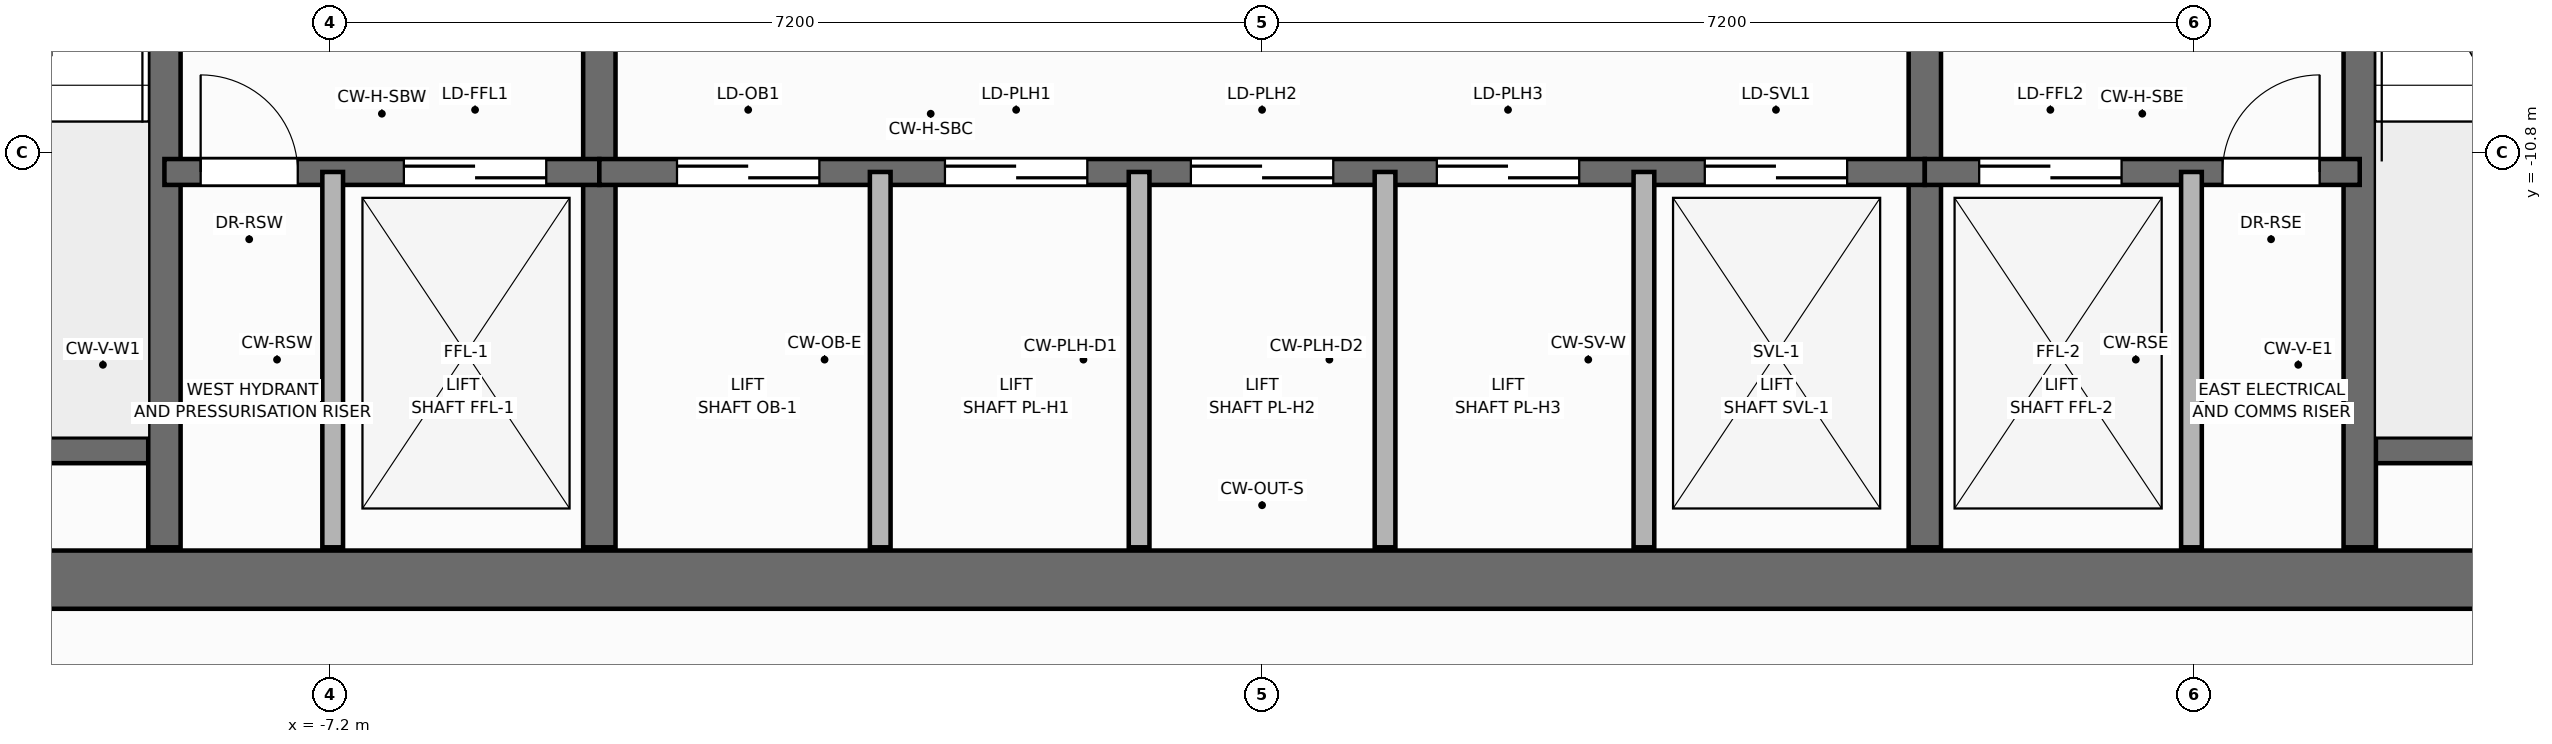
"""IFC4 building model, lengths in metres.
Left out: names, types, materials, properties, quantities, classifications, styles, units other than length and angle.
Written with IfcOpenShell. Run it as: python <this file> out.ifc"""

import sys

from ifc_helpers import new_model, si_unit, direction, frame, frame_2d, origin, place, context, subcontext, project, spatial, rectangle, extrude, element, fill, save


model = new_model("IFC4")
c1 = context("Model", 3, precision=1e-05, world=origin(), true_north=direction((0.0, 1.0)))
c2 = subcontext(c1, "Body", "Model", "MODEL_VIEW")
j1 = project(units=[si_unit("LENGTHUNIT", "METRE"), si_unit("PLANEANGLEUNIT", "RADIAN")], contexts=[c1])
p1 = place(None, origin())
s1 = spatial("IfcSite", under=j1, at=p1, CompositionType="ELEMENT")
p2 = place(p1, origin())
s2 = spatial("IfcBuilding", under=s1, at=p2, CompositionType="ELEMENT")
p3 = place(p2, frame((0.0, 0.0, -4.8)))
s3 = spatial("IfcBuildingStorey", under=s2, at=p3, CompositionType="ELEMENT", Elevation=-4.8)
p4 = place(p3, frame((-12.65, -14.1, 0.0), z_axis=(0.0, 0.0, 1.0), x_axis=(1.0, 0.0, 0.0)))
e1 = element("IfcWall", 1, at=p4, inside=s3, PredefinedType="SHEAR", context=c2, shape_type="SweptSolid", body=[
    extrude(rectangle(XDim=25.3, YDim=0.45, at=frame_2d((12.65, 0.0))), origin(), (0.0, 0.0, 1.0), 4.8),
])
for number, where, z_axis, x_axis in (
    (2, (-12.35, -13.1, 0.0), (0.0, 0.0, 1.0), (1.0, 0.0, 0.0)),
    (3, (8.48, -13.1, 0.0), (0.0, 0.0, 1.0), (1.0, 0.0, 0.0)),
):
    element("IfcWall", number, at=place(p3, frame(where, z_axis=z_axis, x_axis=x_axis)), inside=s3, PredefinedType="SOLIDWALL", context=c2, shape_type="SweptSolid", body=[
        extrude(rectangle(XDim=3.87, YDim=0.2, at=frame_2d((1.935, 0.0))), origin(), (0.0, 0.0, 1.0), 4.8),
    ])
p5 = place(p3, frame((-8.48, -13.85, 0.0), z_axis=(0.0, 0.0, 1.0), x_axis=(0.0, 1.0, 0.0)))
e4 = element("IfcWall", 4, at=p5, inside=s3, PredefinedType="SHEAR", context=c2, shape_type="SweptSolid", body=[
    extrude(rectangle(XDim=9.4, YDim=0.25, at=frame_2d((4.7, 0.0))), origin(), (0.0, 0.0, 1.0), 4.8),
])
p6 = place(p5, frame((6.95, 0.0, 0.0)))
e5 = element("IfcOpeningElement", 5, at=p6, cuts=e4, PredefinedType="OPENING", context=c2, shape_type="SweptSolid", body=[
    extrude(rectangle(XDim=1.006, YDim=2.104, at=frame_2d((0.5, 1.052))), frame((0.0, 0.135, 0.0), z_axis=(0.0, -1.0, 0.0), x_axis=(1.0, 0.0, 0.0)), (0.0, 0.0, 1.0), 0.27),
])
p7 = place(p3, frame((8.48, -13.85, 0.0), z_axis=(0.0, 0.0, 1.0), x_axis=(0.0, 1.0, 0.0)))
e6 = element("IfcWall", 6, at=p7, inside=s3, PredefinedType="SHEAR", context=c2, shape_type="SweptSolid", body=[
    extrude(rectangle(XDim=9.4, YDim=0.25, at=frame_2d((4.7, 0.0))), origin(), (0.0, 0.0, 1.0), 4.8),
])
p8 = place(p7, frame((6.95, 0.0, 0.0)))
e7 = element("IfcOpeningElement", 7, at=p8, cuts=e6, PredefinedType="OPENING", context=c2, shape_type="SweptSolid", body=[
    extrude(rectangle(XDim=1.006, YDim=2.104, at=frame_2d((0.5, 1.052))), frame((0.0, 0.135, 0.0), z_axis=(0.0, -1.0, 0.0), x_axis=(1.0, 0.0, 0.0)), (0.0, 0.0, 1.0), 0.27),
])
for number, where, z_axis, x_axis in (
    (8, (-5.12, -13.85, 0.0), (0.0, 0.0, 1.0), (0.0, 1.0, 0.0)),
    (9, (5.12, -13.85, 0.0), (0.0, 0.0, 1.0), (0.0, 1.0, 0.0)),
):
    element("IfcWall", number, at=place(p3, frame(where, z_axis=z_axis, x_axis=x_axis)), inside=s3, PredefinedType="SHEAR", context=c2, shape_type="SweptSolid", body=[
        extrude(rectangle(XDim=9.4, YDim=0.25, at=frame_2d((4.7, 0.0))), origin(), (0.0, 0.0, 1.0), 4.8),
    ])
p9 = place(p3, frame((-8.48, -10.95, 0.0), z_axis=(0.0, 0.0, 1.0), x_axis=(1.0, 0.0, 0.0)))
e10 = element("IfcWall", 10, at=p9, inside=s3, PredefinedType="SOLIDWALL", context=c2, shape_type="SweptSolid", body=[
    extrude(rectangle(XDim=3.36, YDim=0.2, at=frame_2d((1.68, 0.0))), origin(), (0.0, 0.0, 1.0), 4.8),
])
p10 = place(p9, frame((0.28, 0.0, 0.0)))
e11 = element("IfcOpeningElement", 11, at=p10, cuts=e10, PredefinedType="OPENING", context=c2, shape_type="SweptSolid", body=[
    extrude(rectangle(XDim=0.756, YDim=2.054, at=frame_2d((0.375, 1.027))), frame((0.0, 0.11, 0.0), z_axis=(0.0, -1.0, 0.0), x_axis=(1.0, 0.0, 0.0)), (0.0, 0.0, 1.0), 0.22),
])
p11 = place(p9, frame((1.85, 0.0, 0.0)))
e12 = element("IfcOpeningElement", 12, at=p11, cuts=e10, PredefinedType="OPENING", context=c2, shape_type="SweptSolid", body=[
    extrude(rectangle(XDim=1.106, YDim=2.104, at=frame_2d((0.55, 1.052))), frame((0.0, 0.11, 0.0), z_axis=(0.0, -1.0, 0.0), x_axis=(1.0, 0.0, 0.0)), (0.0, 0.0, 1.0), 0.22),
])
p12 = place(p3, frame((-5.12, -10.95, 0.0), z_axis=(0.0, 0.0, 1.0), x_axis=(1.0, 0.0, 0.0)))
e13 = element("IfcWall", 13, at=p12, inside=s3, PredefinedType="SOLIDWALL", context=c2, shape_type="SweptSolid", body=[
    extrude(rectangle(XDim=10.24, YDim=0.2, at=frame_2d((5.12, 0.0))), origin(), (0.0, 0.0, 1.0), 4.8),
])
p13 = place(p12, frame((0.6, 0.0, 0.0)))
e14 = element("IfcOpeningElement", 14, at=p13, cuts=e13, PredefinedType="OPENING", context=c2, shape_type="SweptSolid", body=[
    extrude(rectangle(XDim=1.106, YDim=2.104, at=frame_2d((0.55, 1.052))), frame((0.0, 0.11, 0.0), z_axis=(0.0, -1.0, 0.0), x_axis=(1.0, 0.0, 0.0)), (0.0, 0.0, 1.0), 0.22),
])
p14 = place(p12, frame((2.67, 0.0, 0.0)))
e15 = element("IfcOpeningElement", 15, at=p14, cuts=e13, PredefinedType="OPENING", context=c2, shape_type="SweptSolid", body=[
    extrude(rectangle(XDim=1.106, YDim=2.104, at=frame_2d((0.55, 1.052))), frame((0.0, 0.11, 0.0), z_axis=(0.0, -1.0, 0.0), x_axis=(1.0, 0.0, 0.0)), (0.0, 0.0, 1.0), 0.22),
])
p15 = place(p12, frame((4.57, 0.0, 0.0)))
e16 = element("IfcOpeningElement", 16, at=p15, cuts=e13, PredefinedType="OPENING", context=c2, shape_type="SweptSolid", body=[
    extrude(rectangle(XDim=1.106, YDim=2.104, at=frame_2d((0.55, 1.052))), frame((0.0, 0.11, 0.0), z_axis=(0.0, -1.0, 0.0), x_axis=(1.0, 0.0, 0.0)), (0.0, 0.0, 1.0), 0.22),
])
p16 = place(p12, frame((6.47, 0.0, 0.0)))
e17 = element("IfcOpeningElement", 17, at=p16, cuts=e13, PredefinedType="OPENING", context=c2, shape_type="SweptSolid", body=[
    extrude(rectangle(XDim=1.106, YDim=2.104, at=frame_2d((0.55, 1.052))), frame((0.0, 0.11, 0.0), z_axis=(0.0, -1.0, 0.0), x_axis=(1.0, 0.0, 0.0)), (0.0, 0.0, 1.0), 0.22),
])
p17 = place(p12, frame((8.54, 0.0, 0.0)))
e18 = element("IfcOpeningElement", 18, at=p17, cuts=e13, PredefinedType="OPENING", context=c2, shape_type="SweptSolid", body=[
    extrude(rectangle(XDim=1.106, YDim=2.104, at=frame_2d((0.55, 1.052))), frame((0.0, 0.11, 0.0), z_axis=(0.0, -1.0, 0.0), x_axis=(1.0, 0.0, 0.0)), (0.0, 0.0, 1.0), 0.22),
])
p18 = place(p3, frame((5.12, -10.95, 0.0), z_axis=(0.0, 0.0, 1.0), x_axis=(1.0, 0.0, 0.0)))
e19 = element("IfcWall", 19, at=p18, inside=s3, PredefinedType="SOLIDWALL", context=c2, shape_type="SweptSolid", body=[
    extrude(rectangle(XDim=3.36, YDim=0.2, at=frame_2d((1.68, 0.0))), origin(), (0.0, 0.0, 1.0), 4.8),
])
p19 = place(p18, frame((0.42, 0.0, 0.0)))
e20 = element("IfcOpeningElement", 20, at=p19, cuts=e19, PredefinedType="OPENING", context=c2, shape_type="SweptSolid", body=[
    extrude(rectangle(XDim=1.106, YDim=2.104, at=frame_2d((0.55, 1.052))), frame((0.0, 0.11, 0.0), z_axis=(0.0, -1.0, 0.0), x_axis=(1.0, 0.0, 0.0)), (0.0, 0.0, 1.0), 0.22),
])
p20 = place(p18, frame((2.3, 0.0, 0.0)))
e21 = element("IfcOpeningElement", 21, at=p20, cuts=e19, PredefinedType="OPENING", context=c2, shape_type="SweptSolid", body=[
    extrude(rectangle(XDim=0.756, YDim=2.054, at=frame_2d((0.375, 1.027))), frame((0.0, 0.11, 0.0), z_axis=(0.0, -1.0, 0.0), x_axis=(1.0, 0.0, 0.0)), (0.0, 0.0, 1.0), 0.22),
])
for number, where, z_axis, x_axis in (
    (22, (-7.18, -13.85, 0.0), (0.0, 0.0, 1.0), (0.0, 1.0, 0.0)),
    (23, (7.18, -13.85, 0.0), (0.0, 0.0, 1.0), (0.0, 1.0, 0.0)),
    (24, (-2.95, -13.85, 0.0), (0.0, 0.0, 1.0), (0.0, 1.0, 0.0)),
    (25, (2.95, -13.85, 0.0), (0.0, 0.0, 1.0), (0.0, 1.0, 0.0)),
    (26, (-0.95, -13.85, 0.0), (0.0, 0.0, 1.0), (0.0, 1.0, 0.0)),
    (27, (0.95, -13.85, 0.0), (0.0, 0.0, 1.0), (0.0, 1.0, 0.0)),
):
    element("IfcWall", number, at=place(p3, frame(where, z_axis=z_axis, x_axis=x_axis)), inside=s3, PredefinedType="PARTITIONING", context=c2, shape_type="SweptSolid", body=[
        extrude(rectangle(XDim=2.9, YDim=0.16, at=frame_2d((1.45, 0.0))), origin(), (0.0, 0.0, 1.0), 3.505),
    ])
p21 = place(p10, origin())
e28 = element("IfcDoor", 28, at=p21, inside=s3, OperationType="SINGLE_SWING_LEFT", PredefinedType="DOOR", context=c2, shape_type="SweptSolid", body=[
    extrude(rectangle(XDim=0.75, YDim=2.05, at=frame_2d((0.375, 1.025))), frame((0.0, 0.025, 0.0), z_axis=(0.0, -1.0, 0.0), x_axis=(1.0, 0.0, 0.0)), (0.0, 0.0, 1.0), 0.05),
])
fill(e11, e28)
p22 = place(p11, origin())
e29 = element("IfcDoor", 29, at=p22, inside=s3, OperationType="DOUBLE_DOOR_SLIDING", PredefinedType="DOOR", context=c2, shape_type="SweptSolid", body=[
    extrude(rectangle(XDim=1.1, YDim=2.1, at=frame_2d((0.55, 1.05))), frame((0.0, 0.025, 0.0), z_axis=(0.0, -1.0, 0.0), x_axis=(1.0, 0.0, 0.0)), (0.0, 0.0, 1.0), 0.05),
])
fill(e12, e29)
p23 = place(p19, origin())
e30 = element("IfcDoor", 30, at=p23, inside=s3, OperationType="DOUBLE_DOOR_SLIDING", PredefinedType="DOOR", context=c2, shape_type="SweptSolid", body=[
    extrude(rectangle(XDim=1.1, YDim=2.1, at=frame_2d((0.55, 1.05))), frame((0.0, 0.025, 0.0), z_axis=(0.0, -1.0, 0.0), x_axis=(1.0, 0.0, 0.0)), (0.0, 0.0, 1.0), 0.05),
])
fill(e20, e30)
p24 = place(p20, origin())
e31 = element("IfcDoor", 31, at=p24, inside=s3, OperationType="SINGLE_SWING_RIGHT", PredefinedType="DOOR", context=c2, shape_type="SweptSolid", body=[
    extrude(rectangle(XDim=0.75, YDim=2.05, at=frame_2d((0.375, 1.025))), frame((0.0, 0.025, 0.0), z_axis=(0.0, -1.0, 0.0), x_axis=(1.0, 0.0, 0.0)), (0.0, 0.0, 1.0), 0.05),
])
fill(e21, e31)
p25 = place(p13, origin())
e32 = element("IfcDoor", 32, at=p25, inside=s3, OperationType="DOUBLE_DOOR_SLIDING", PredefinedType="DOOR", context=c2, shape_type="SweptSolid", body=[
    extrude(rectangle(XDim=1.1, YDim=2.1, at=frame_2d((0.55, 1.05))), frame((0.0, 0.025, 0.0), z_axis=(0.0, -1.0, 0.0), x_axis=(1.0, 0.0, 0.0)), (0.0, 0.0, 1.0), 0.05),
])
fill(e14, e32)
p26 = place(p14, origin())
e33 = element("IfcDoor", 33, at=p26, inside=s3, OperationType="DOUBLE_DOOR_SLIDING", PredefinedType="DOOR", context=c2, shape_type="SweptSolid", body=[
    extrude(rectangle(XDim=1.1, YDim=2.1, at=frame_2d((0.55, 1.05))), frame((0.0, 0.025, 0.0), z_axis=(0.0, -1.0, 0.0), x_axis=(1.0, 0.0, 0.0)), (0.0, 0.0, 1.0), 0.05),
])
fill(e15, e33)
p27 = place(p15, origin())
e34 = element("IfcDoor", 34, at=p27, inside=s3, OperationType="DOUBLE_DOOR_SLIDING", PredefinedType="DOOR", context=c2, shape_type="SweptSolid", body=[
    extrude(rectangle(XDim=1.1, YDim=2.1, at=frame_2d((0.55, 1.05))), frame((0.0, 0.025, 0.0), z_axis=(0.0, -1.0, 0.0), x_axis=(1.0, 0.0, 0.0)), (0.0, 0.0, 1.0), 0.05),
])
fill(e16, e34)
p28 = place(p16, origin())
e35 = element("IfcDoor", 35, at=p28, inside=s3, OperationType="DOUBLE_DOOR_SLIDING", PredefinedType="DOOR", context=c2, shape_type="SweptSolid", body=[
    extrude(rectangle(XDim=1.1, YDim=2.1, at=frame_2d((0.55, 1.05))), frame((0.0, 0.025, 0.0), z_axis=(0.0, -1.0, 0.0), x_axis=(1.0, 0.0, 0.0)), (0.0, 0.0, 1.0), 0.05),
])
fill(e17, e35)
p29 = place(p17, origin())
e36 = element("IfcDoor", 36, at=p29, inside=s3, OperationType="DOUBLE_DOOR_SLIDING", PredefinedType="DOOR", context=c2, shape_type="SweptSolid", body=[
    extrude(rectangle(XDim=1.1, YDim=2.1, at=frame_2d((0.55, 1.05))), frame((0.0, 0.025, 0.0), z_axis=(0.0, -1.0, 0.0), x_axis=(1.0, 0.0, 0.0)), (0.0, 0.0, 1.0), 0.05),
])
fill(e18, e36)
save(model, sys.argv[1])
